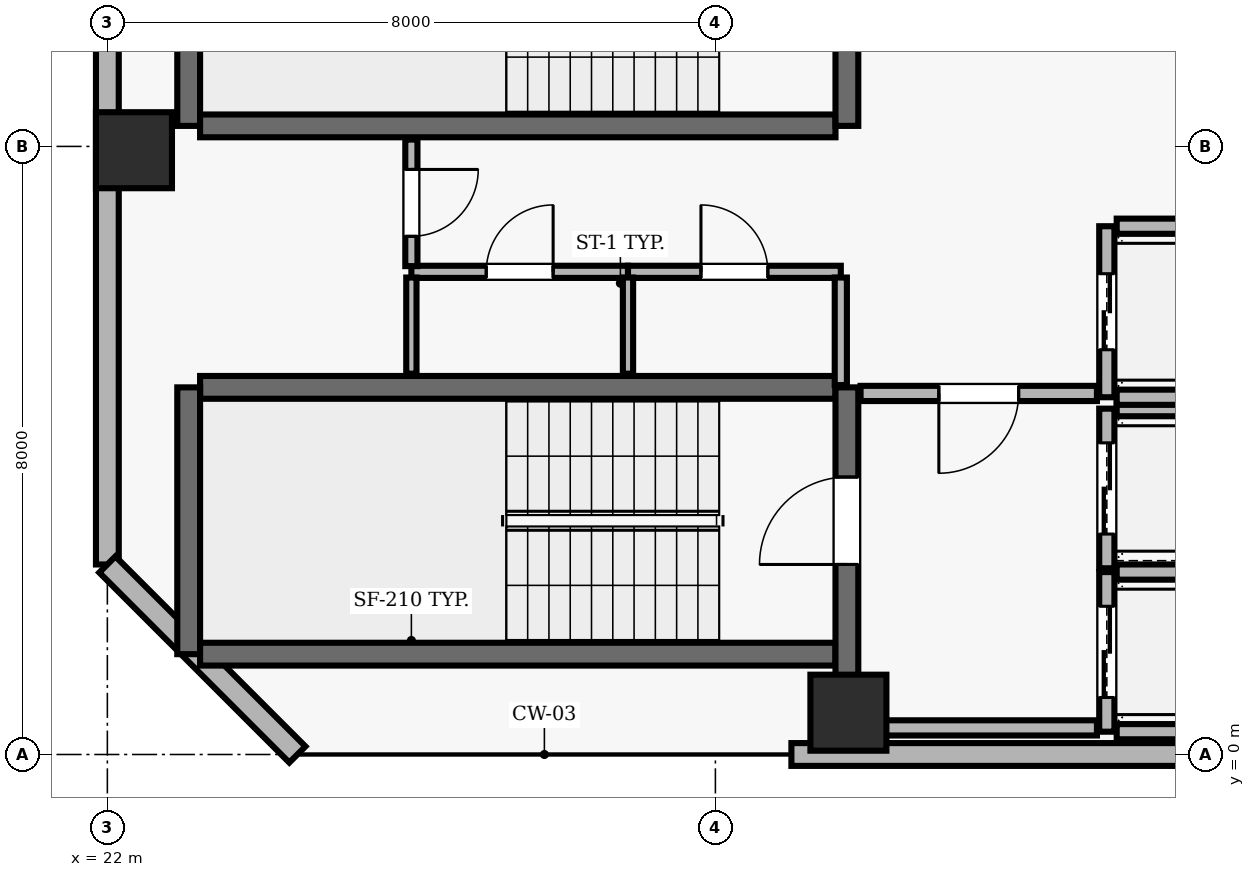
"""IFC4 building model, lengths in metres.
Left out: names, types, materials, properties, quantities, classifications, styles, units other than length and angle.
Written with IfcOpenShell. Run it as: python <this file> out.ifc"""

import sys

from ifc_helpers import new_model, si_unit, direction, frame, frame_2d, origin, origin_2d, place, context, subcontext, project, spatial, rectangle, extrude, element, fill, save


model = new_model("IFC4")
c1 = context("Model", 3, precision=1e-05, world=origin(), true_north=direction((0.0, 1.0)))
c2 = subcontext(c1, "Body", "Model", "MODEL_VIEW")
j1 = project(units=[si_unit("LENGTHUNIT", "METRE"), si_unit("PLANEANGLEUNIT", "RADIAN")], contexts=[c1])
p1 = place(None, origin())
s1 = spatial("IfcSite", under=j1, at=p1, CompositionType="ELEMENT")
p2 = place(p1, origin())
s2 = spatial("IfcBuilding", under=s1, at=p2, CompositionType="ELEMENT")
p3 = place(p2, frame((0.0, 0.0, 183.6)))
s3 = spatial("IfcBuildingStorey", under=s2, at=p3, CompositionType="ELEMENT", Elevation=183.6)
for number, where, z_axis, x_axis in (
    (1, (31.75, 0.55, 0.0), (0.0, 0.0, 1.0), (1.0, 0.0, 0.0)),
    (2, (22.35, 7.95, 0.0), (0.0, 0.0, 1.0), (1.0, 0.0, 0.0)),
):
    element("IfcColumn", number, at=place(p3, frame(where, z_axis=z_axis, x_axis=x_axis)), inside=s3, PredefinedType="COLUMN", context=c2, shape_type="SweptSolid", body=[
        extrude(rectangle(XDim=1.0, YDim=1.0, at=origin_2d()), origin(), (0.0, 0.0, 1.0), 3.9),
    ])
p4 = place(p3, frame((31.0, 0.0, 0.0), z_axis=(0.0, 0.0, 1.0), x_axis=(1.0, 0.0, 0.0)))
e3 = element("IfcWall", 3, at=p4, inside=s3, PredefinedType="SOLIDWALL", context=c2, shape_type="SweptSolid", body=[
    extrude(rectangle(XDim=7.4, YDim=0.3, at=frame_2d((3.7, 0.0))), origin(), (0.0, 0.0, 1.0), 3.69),
])
p5 = place(p3, frame((22.0, 40.7, 0.0), z_axis=(0.0, 0.0, 1.0), x_axis=(0.0, -1.0, 0.0)))
e4 = element("IfcWall", 4, at=p5, inside=s3, PredefinedType="SOLIDWALL", context=c2, shape_type="SweptSolid", body=[
    extrude(rectangle(XDim=38.2, YDim=0.3, at=frame_2d((19.1, 0.0))), origin(), (0.0, 0.0, 1.0), 3.69),
])
p6 = place(p5, frame((6.7, 0.0, 0.0)))
e5 = element("IfcOpeningElement", 5, at=p6, cuts=e4, PredefinedType="OPENING", context=c2, shape_type="SweptSolid", body=[
    extrude(rectangle(XDim=1.0, YDim=2.2, at=frame_2d((0.5, 1.1))), frame((0.0, 0.16, 0.0), z_axis=(0.0, -1.0, 0.0), x_axis=(1.0, 0.0, 0.0)), (0.0, 0.0, 1.0), 0.32),
])
p7 = place(p5, frame((11.343, 0.0, 0.9)))
e6 = element("IfcOpeningElement", 6, at=p7, cuts=e4, PredefinedType="OPENING", context=c2, shape_type="SweptSolid", body=[
    extrude(rectangle(XDim=2.8, YDim=1.8, at=frame_2d((1.4, 0.9))), frame((0.0, 0.16, 0.0), z_axis=(0.0, -1.0, 0.0), x_axis=(1.0, 0.0, 0.0)), (0.0, 0.0, 1.0), 0.32),
])
p8 = place(p5, frame((18.15, 0.0, 0.9)))
e7 = element("IfcOpeningElement", 7, at=p8, cuts=e4, PredefinedType="OPENING", context=c2, shape_type="SweptSolid", body=[
    extrude(rectangle(XDim=2.8, YDim=1.8, at=frame_2d((1.4, 0.9))), frame((0.0, 0.16, 0.0), z_axis=(0.0, -1.0, 0.0), x_axis=(1.0, 0.0, 0.0)), (0.0, 0.0, 1.0), 0.32),
])
p9 = place(p5, frame((22.257, 0.0, 0.9)))
e8 = element("IfcOpeningElement", 8, at=p9, cuts=e4, PredefinedType="OPENING", context=c2, shape_type="SweptSolid", body=[
    extrude(rectangle(XDim=2.8, YDim=1.8, at=frame_2d((1.4, 0.9))), frame((0.0, 0.16, 0.0), z_axis=(0.0, -1.0, 0.0), x_axis=(1.0, 0.0, 0.0)), (0.0, 0.0, 1.0), 0.32),
])
p10 = place(p5, frame((28.614, 0.0, 0.9)))
e9 = element("IfcOpeningElement", 9, at=p10, cuts=e4, PredefinedType="OPENING", context=c2, shape_type="SweptSolid", body=[
    extrude(rectangle(XDim=2.8, YDim=1.8, at=frame_2d((1.4, 0.9))), frame((0.0, 0.16, 0.0), z_axis=(0.0, -1.0, 0.0), x_axis=(1.0, 0.0, 0.0)), (0.0, 0.0, 1.0), 0.32),
])
p11 = place(p3, frame((22.0, 2.5, 0.0), z_axis=(0.0, 0.0, 1.0), x_axis=(0.707106781187, -0.707106781187, 0.0)))
e10 = element("IfcWall", 10, at=p11, inside=s3, PredefinedType="SOLIDWALL", context=c2, shape_type="SweptSolid", body=[
    extrude(rectangle(XDim=3.536, YDim=0.3, at=frame_2d((1.768, 0.0))), origin(), (0.0, 0.0, 1.0), 3.69),
])
p12 = place(p3, frame((31.58, 4.83, 0.0), z_axis=(0.0, 0.0, 1.0), x_axis=(-1.0, 0.0, 0.0)))
e11 = element("IfcWall", 11, at=p12, inside=s3, PredefinedType="SHEAR", context=c2, shape_type="SweptSolid", body=[
    extrude(rectangle(XDim=8.36, YDim=0.3, at=frame_2d((4.18, 0.0))), origin(), (0.0, 0.0, 1.0), 3.69),
])
p13 = place(p3, frame((23.07, 4.83, 0.0), z_axis=(0.0, 0.0, 1.0), x_axis=(0.0, -1.0, 0.0)))
e12 = element("IfcWall", 12, at=p13, inside=s3, PredefinedType="SHEAR", context=c2, shape_type="SweptSolid", body=[
    extrude(rectangle(XDim=3.51, YDim=0.3, at=frame_2d((1.755, 0.0))), origin(), (0.0, 0.0, 1.0), 3.69),
])
p14 = place(p3, frame((23.22, 1.32, 0.0), z_axis=(0.0, 0.0, 1.0), x_axis=(1.0, 0.0, 0.0)))
e13 = element("IfcWall", 13, at=p14, inside=s3, PredefinedType="SHEAR", context=c2, shape_type="SweptSolid", body=[
    extrude(rectangle(XDim=8.36, YDim=0.3, at=frame_2d((4.18, 0.0))), origin(), (0.0, 0.0, 1.0), 3.69),
])
p15 = place(p3, frame((31.73, 0.96, 0.0), z_axis=(0.0, 0.0, 1.0), x_axis=(0.0, 1.0, 0.0)))
e14 = element("IfcWall", 14, at=p15, inside=s3, PredefinedType="SHEAR", context=c2, shape_type="SweptSolid", body=[
    extrude(rectangle(XDim=3.87, YDim=0.3, at=frame_2d((1.935, 0.0))), origin(), (0.0, 0.0, 1.0), 3.69),
])
p16 = place(p15, frame((1.54, 0.0, 0.0)))
e15 = element("IfcOpeningElement", 15, at=p16, cuts=e14, PredefinedType="OPENING", context=c2, shape_type="SweptSolid", body=[
    extrude(rectangle(XDim=1.15, YDim=2.15, at=frame_2d((0.575, 1.075))), frame((0.0, 0.16, 0.0), z_axis=(0.0, -1.0, 0.0), x_axis=(1.0, 0.0, 0.0)), (0.0, 0.0, 1.0), 0.32),
])
p17 = place(p3, frame((23.07, 11.78, 0.0), z_axis=(0.0, 0.0, 1.0), x_axis=(0.0, -1.0, 0.0)))
e16 = element("IfcWall", 16, at=p17, inside=s3, PredefinedType="SHEAR", context=c2, shape_type="SweptSolid", body=[
    extrude(rectangle(XDim=3.51, YDim=0.3, at=frame_2d((1.755, 0.0))), origin(), (0.0, 0.0, 1.0), 3.69),
])
p18 = place(p3, frame((23.22, 8.27, 0.0), z_axis=(0.0, 0.0, 1.0), x_axis=(1.0, 0.0, 0.0)))
e17 = element("IfcWall", 17, at=p18, inside=s3, PredefinedType="SHEAR", context=c2, shape_type="SweptSolid", body=[
    extrude(rectangle(XDim=8.36, YDim=0.3, at=frame_2d((4.18, 0.0))), origin(), (0.0, 0.0, 1.0), 3.69),
])
p19 = place(p3, frame((31.73, 8.27, 0.0), z_axis=(0.0, 0.0, 1.0), x_axis=(0.0, 1.0, 0.0)))
e18 = element("IfcWall", 18, at=p19, inside=s3, PredefinedType="SHEAR", context=c2, shape_type="SweptSolid", body=[
    extrude(rectangle(XDim=3.51, YDim=0.3, at=frame_2d((1.755, 0.0))), origin(), (0.0, 0.0, 1.0), 3.69),
])
p20 = place(p19, frame((1.18, 0.0, 0.0)))
e19 = element("IfcOpeningElement", 19, at=p20, cuts=e18, PredefinedType="OPENING", context=c2, shape_type="SweptSolid", body=[
    extrude(rectangle(XDim=1.15, YDim=2.15, at=frame_2d((0.575, 1.075))), frame((0.0, 0.16, 0.0), z_axis=(0.0, -1.0, 0.0), x_axis=(1.0, 0.0, 0.0)), (0.0, 0.0, 1.0), 0.32),
])
p21 = place(p3, frame((35.15, 2.4, 0.0), z_axis=(0.0, 0.0, 1.0), x_axis=(0.0, -1.0, 0.0)))
e20 = element("IfcWall", 20, at=p21, inside=s3, PredefinedType="SOLIDWALL", context=c2, shape_type="SweptSolid", body=[
    extrude(rectangle(XDim=2.1, YDim=0.2, at=frame_2d((1.05, 0.0))), origin(), (0.0, 0.0, 1.0), 3.69),
])
p22 = place(p21, frame((0.45, 0.0, 0.0)))
e21 = element("IfcOpeningElement", 21, at=p22, cuts=e20, PredefinedType="OPENING", context=c2, shape_type="SweptSolid", body=[
    extrude(rectangle(XDim=1.2, YDim=2.15, at=frame_2d((0.6, 1.075))), frame((0.0, 0.11, 0.0), z_axis=(0.0, -1.0, 0.0), x_axis=(1.0, 0.0, 0.0)), (0.0, 0.0, 1.0), 0.22),
])
for number, where, z_axis, x_axis in (
    (22, (35.28, 0.3, 0.0), (0.0, 0.0, 1.0), (1.0, 0.0, 0.0)),
    (23, (37.42, 2.4, 0.0), (0.0, 0.0, 1.0), (-1.0, 0.0, 0.0)),
):
    element("IfcWall", number, at=place(p3, frame(where, z_axis=z_axis, x_axis=x_axis)), inside=s3, PredefinedType="SOLIDWALL", context=c2, shape_type="SweptSolid", body=[
        extrude(rectangle(XDim=2.14, YDim=0.2, at=frame_2d((1.07, 0.0))), origin(), (0.0, 0.0, 1.0), 3.69),
    ])
p23 = place(p3, frame((35.15, 4.55, 0.0), z_axis=(0.0, 0.0, 1.0), x_axis=(0.0, -1.0, 0.0)))
e24 = element("IfcWall", 24, at=p23, inside=s3, PredefinedType="SOLIDWALL", context=c2, shape_type="SweptSolid", body=[
    extrude(rectangle(XDim=2.1, YDim=0.2, at=frame_2d((1.05, 0.0))), origin(), (0.0, 0.0, 1.0), 3.69),
])
p24 = place(p23, frame((0.45, 0.0, 0.0)))
e25 = element("IfcOpeningElement", 25, at=p24, cuts=e24, PredefinedType="OPENING", context=c2, shape_type="SweptSolid", body=[
    extrude(rectangle(XDim=1.2, YDim=2.15, at=frame_2d((0.6, 1.075))), frame((0.0, 0.11, 0.0), z_axis=(0.0, -1.0, 0.0), x_axis=(1.0, 0.0, 0.0)), (0.0, 0.0, 1.0), 0.22),
])
p25 = place(p3, frame((37.42, 4.55, 0.0), z_axis=(0.0, 0.0, 1.0), x_axis=(-1.0, 0.0, 0.0)))
e26 = element("IfcWall", 26, at=p25, inside=s3, PredefinedType="SOLIDWALL", context=c2, shape_type="SweptSolid", body=[
    extrude(rectangle(XDim=2.14, YDim=0.2, at=frame_2d((1.07, 0.0))), origin(), (0.0, 0.0, 1.0), 3.69),
])
p26 = place(p3, frame((35.15, 6.95, 0.0), z_axis=(0.0, 0.0, 1.0), x_axis=(0.0, -1.0, 0.0)))
e27 = element("IfcWall", 27, at=p26, inside=s3, PredefinedType="SOLIDWALL", context=c2, shape_type="SweptSolid", body=[
    extrude(rectangle(XDim=2.25, YDim=0.2, at=frame_2d((1.125, 0.0))), origin(), (0.0, 0.0, 1.0), 3.69),
])
p27 = place(p26, frame((0.625, 0.0, 0.0)))
e28 = element("IfcOpeningElement", 28, at=p27, cuts=e27, PredefinedType="OPENING", context=c2, shape_type="SweptSolid", body=[
    extrude(rectangle(XDim=1.0, YDim=2.1, at=frame_2d((0.5, 1.05))), frame((0.0, 0.11, 0.0), z_axis=(0.0, -1.0, 0.0), x_axis=(1.0, 0.0, 0.0)), (0.0, 0.0, 1.0), 0.22),
])
for number, where, z_axis, x_axis in (
    (29, (35.28, 4.7, 0.0), (0.0, 0.0, 1.0), (1.0, 0.0, 0.0)),
    (30, (37.42, 6.95, 0.0), (0.0, 0.0, 1.0), (-1.0, 0.0, 0.0)),
):
    element("IfcWall", number, at=place(p3, frame(where, z_axis=z_axis, x_axis=x_axis)), inside=s3, PredefinedType="SOLIDWALL", context=c2, shape_type="SweptSolid", body=[
        extrude(rectangle(XDim=2.14, YDim=0.2, at=frame_2d((1.07, 0.0))), origin(), (0.0, 0.0, 1.0), 3.69),
    ])
p28 = place(p3, frame((26.0, 6.35, 0.0), z_axis=(0.0, 0.0, 1.0), x_axis=(1.0, 0.0, 0.0)))
e31 = element("IfcWall", 31, at=p28, inside=s3, PredefinedType="PARTITIONING", context=c2, shape_type="SweptSolid", body=[
    extrude(rectangle(XDim=2.85, YDim=0.16, at=frame_2d((1.425, 0.0))), origin(), (0.0, 0.0, 1.0), 3.69),
])
p29 = place(p28, frame((0.985, 0.0, 0.0)))
e32 = element("IfcOpeningElement", 32, at=p29, cuts=e31, PredefinedType="OPENING", context=c2, shape_type="SweptSolid", body=[
    extrude(rectangle(XDim=0.88, YDim=2.1, at=frame_2d((0.44, 1.05))), frame((0.0, 0.09, 0.0), z_axis=(0.0, -1.0, 0.0), x_axis=(1.0, 0.0, 0.0)), (0.0, 0.0, 1.0), 0.18),
])
p30 = place(p3, frame((28.85, 6.35, 0.0), z_axis=(0.0, 0.0, 1.0), x_axis=(1.0, 0.0, 0.0)))
e33 = element("IfcWall", 33, at=p30, inside=s3, PredefinedType="PARTITIONING", context=c2, shape_type="SweptSolid", body=[
    extrude(rectangle(XDim=2.8, YDim=0.16, at=frame_2d((1.4, 0.0))), origin(), (0.0, 0.0, 1.0), 3.69),
])
p31 = place(p30, frame((0.96, 0.0, 0.0)))
e34 = element("IfcOpeningElement", 34, at=p31, cuts=e33, PredefinedType="OPENING", context=c2, shape_type="SweptSolid", body=[
    extrude(rectangle(XDim=0.88, YDim=2.1, at=frame_2d((0.44, 1.05))), frame((0.0, 0.09, 0.0), z_axis=(0.0, -1.0, 0.0), x_axis=(1.0, 0.0, 0.0)), (0.0, 0.0, 1.0), 0.18),
])
p32 = place(p3, frame((31.65, 0.35, 0.0), z_axis=(0.0, 0.0, 1.0), x_axis=(1.0, 0.0, 0.0)))
e35 = element("IfcWall", 35, at=p32, inside=s3, PredefinedType="SOLIDWALL", context=c2, shape_type="SweptSolid", body=[
    extrude(rectangle(XDim=3.37, YDim=0.2, at=frame_2d((1.685, 0.0))), origin(), (0.0, 0.0, 1.0), 3.69),
])
p33 = place(p3, frame((35.02, 4.75, 0.0), z_axis=(0.0, 0.0, 1.0), x_axis=(-1.0, 0.0, 0.0)))
e36 = element("IfcWall", 36, at=p33, inside=s3, PredefinedType="SOLIDWALL", context=c2, shape_type="SweptSolid", body=[
    extrude(rectangle(XDim=3.11, YDim=0.2, at=frame_2d((1.555, 0.0))), origin(), (0.0, 0.0, 1.0), 3.69),
])
p34 = place(p33, frame((1.03, 0.0, 0.0)))
e37 = element("IfcOpeningElement", 37, at=p34, cuts=e36, PredefinedType="OPENING", context=c2, shape_type="SweptSolid", body=[
    extrude(rectangle(XDim=1.05, YDim=2.15, at=frame_2d((0.525, 1.075))), frame((0.0, 0.11, 0.0), z_axis=(0.0, -1.0, 0.0), x_axis=(1.0, 0.0, 0.0)), (0.0, 0.0, 1.0), 0.22),
])
p35 = place(p3, frame((26.0, 5.01, 0.0), z_axis=(0.0, 0.0, 1.0), x_axis=(0.0, 1.0, 0.0)))
e38 = element("IfcWall", 38, at=p35, inside=s3, PredefinedType="PARTITIONING", context=c2, shape_type="SweptSolid", body=[
    extrude(rectangle(XDim=1.265, YDim=0.135, at=frame_2d((0.632, 0.0))), origin(), (0.0, 0.0, 1.0), 3.69),
])
p36 = place(p3, frame((26.0, 8.09, 0.0), z_axis=(0.0, 0.0, 1.0), x_axis=(0.0, -1.0, 0.0)))
e39 = element("IfcWall", 39, at=p36, inside=s3, PredefinedType="PARTITIONING", context=c2, shape_type="SweptSolid", body=[
    extrude(rectangle(XDim=1.665, YDim=0.16, at=frame_2d((0.833, 0.0))), origin(), (0.0, 0.0, 1.0), 3.69),
])
p37 = place(p36, frame((0.393, 0.0, 0.0)))
e40 = element("IfcOpeningElement", 40, at=p37, cuts=e39, PredefinedType="OPENING", context=c2, shape_type="SweptSolid", body=[
    extrude(rectangle(XDim=0.88, YDim=2.1, at=frame_2d((0.44, 1.05))), frame((0.0, 0.09, 0.0), z_axis=(0.0, -1.0, 0.0), x_axis=(1.0, 0.0, 0.0)), (0.0, 0.0, 1.0), 0.18),
])
p38 = place(p3, frame((28.85, 5.01, 0.0), z_axis=(0.0, 0.0, 1.0), x_axis=(0.0, 1.0, 0.0)))
e41 = element("IfcWall", 41, at=p38, inside=s3, PredefinedType="PARTITIONING", context=c2, shape_type="SweptSolid", body=[
    extrude(rectangle(XDim=1.265, YDim=0.135, at=frame_2d((0.632, 0.0))), origin(), (0.0, 0.0, 1.0), 3.69),
])
p39 = place(p3, frame((31.65, 4.86, 0.0), z_axis=(0.0, 0.0, 1.0), x_axis=(0.0, 1.0, 0.0)))
e42 = element("IfcWall", 42, at=p39, inside=s3, PredefinedType="PARTITIONING", context=c2, shape_type="SweptSolid", body=[
    extrude(rectangle(XDim=1.415, YDim=0.16, at=frame_2d((0.708, 0.0))), origin(), (0.0, 0.0, 1.0), 3.69),
])
p40 = place(p16, origin())
e43 = element("IfcDoor", 43, at=p40, inside=s3, OperationType="SINGLE_SWING_LEFT", PredefinedType="DOOR", context=c2, shape_type="SweptSolid", body=[
    extrude(rectangle(XDim=1.15, YDim=2.15, at=frame_2d((0.575, 1.075))), frame((0.0, 0.025, 0.0), z_axis=(0.0, -1.0, 0.0), x_axis=(1.0, 0.0, 0.0)), (0.0, 0.0, 1.0), 0.05),
])
fill(e15, e43)
p41 = place(p22, origin())
e44 = element("IfcDoor", 44, at=p41, inside=s3, OperationType="DOUBLE_DOOR_SLIDING", PredefinedType="DOOR", context=c2, shape_type="SweptSolid", body=[
    extrude(rectangle(XDim=1.2, YDim=2.15, at=frame_2d((0.6, 1.075))), frame((0.0, 0.025, 0.0), z_axis=(0.0, -1.0, 0.0), x_axis=(1.0, 0.0, 0.0)), (0.0, 0.0, 1.0), 0.05),
])
fill(e21, e44)
p42 = place(p24, origin())
e45 = element("IfcDoor", 45, at=p42, inside=s3, OperationType="DOUBLE_DOOR_SLIDING", PredefinedType="DOOR", context=c2, shape_type="SweptSolid", body=[
    extrude(rectangle(XDim=1.2, YDim=2.15, at=frame_2d((0.6, 1.075))), frame((0.0, 0.025, 0.0), z_axis=(0.0, -1.0, 0.0), x_axis=(1.0, 0.0, 0.0)), (0.0, 0.0, 1.0), 0.05),
])
fill(e25, e45)
p43 = place(p27, origin())
e46 = element("IfcDoor", 46, at=p43, inside=s3, OperationType="DOUBLE_DOOR_SLIDING", PredefinedType="DOOR", context=c2, shape_type="SweptSolid", body=[
    extrude(rectangle(XDim=1.0, YDim=2.1, at=frame_2d((0.5, 1.05))), frame((0.0, 0.025, 0.0), z_axis=(0.0, -1.0, 0.0), x_axis=(1.0, 0.0, 0.0)), (0.0, 0.0, 1.0), 0.05),
])
fill(e28, e46)
p44 = place(p34, origin())
e47 = element("IfcDoor", 47, at=p44, inside=s3, OperationType="SINGLE_SWING_RIGHT", PredefinedType="DOOR", context=c2, shape_type="SweptSolid", body=[
    extrude(rectangle(XDim=1.05, YDim=2.15, at=frame_2d((0.525, 1.075))), frame((0.0, 0.025, 0.0), z_axis=(0.0, -1.0, 0.0), x_axis=(1.0, 0.0, 0.0)), (0.0, 0.0, 1.0), 0.05),
])
fill(e37, e47)
p45 = place(p37, origin())
e48 = element("IfcDoor", 48, at=p45, inside=s3, OperationType="SINGLE_SWING_LEFT", PredefinedType="DOOR", context=c2, shape_type="SweptSolid", body=[
    extrude(rectangle(XDim=0.88, YDim=2.1, at=frame_2d((0.44, 1.05))), frame((0.0, 0.025, 0.0), z_axis=(0.0, -1.0, 0.0), x_axis=(1.0, 0.0, 0.0)), (0.0, 0.0, 1.0), 0.05),
])
fill(e40, e48)
p46 = place(p29, origin())
e49 = element("IfcDoor", 49, at=p46, inside=s3, OperationType="SINGLE_SWING_RIGHT", PredefinedType="DOOR", context=c2, shape_type="SweptSolid", body=[
    extrude(rectangle(XDim=0.88, YDim=2.1, at=frame_2d((0.44, 1.05))), frame((0.0, 0.025, 0.0), z_axis=(0.0, -1.0, 0.0), x_axis=(1.0, 0.0, 0.0)), (0.0, 0.0, 1.0), 0.05),
])
fill(e32, e49)
p47 = place(p31, origin())
e50 = element("IfcDoor", 50, at=p47, inside=s3, OperationType="SINGLE_SWING_LEFT", PredefinedType="DOOR", context=c2, shape_type="SweptSolid", body=[
    extrude(rectangle(XDim=0.88, YDim=2.1, at=frame_2d((0.44, 1.05))), frame((0.0, 0.025, 0.0), z_axis=(0.0, -1.0, 0.0), x_axis=(1.0, 0.0, 0.0)), (0.0, 0.0, 1.0), 0.05),
])
fill(e34, e50)
save(model, sys.argv[1])
